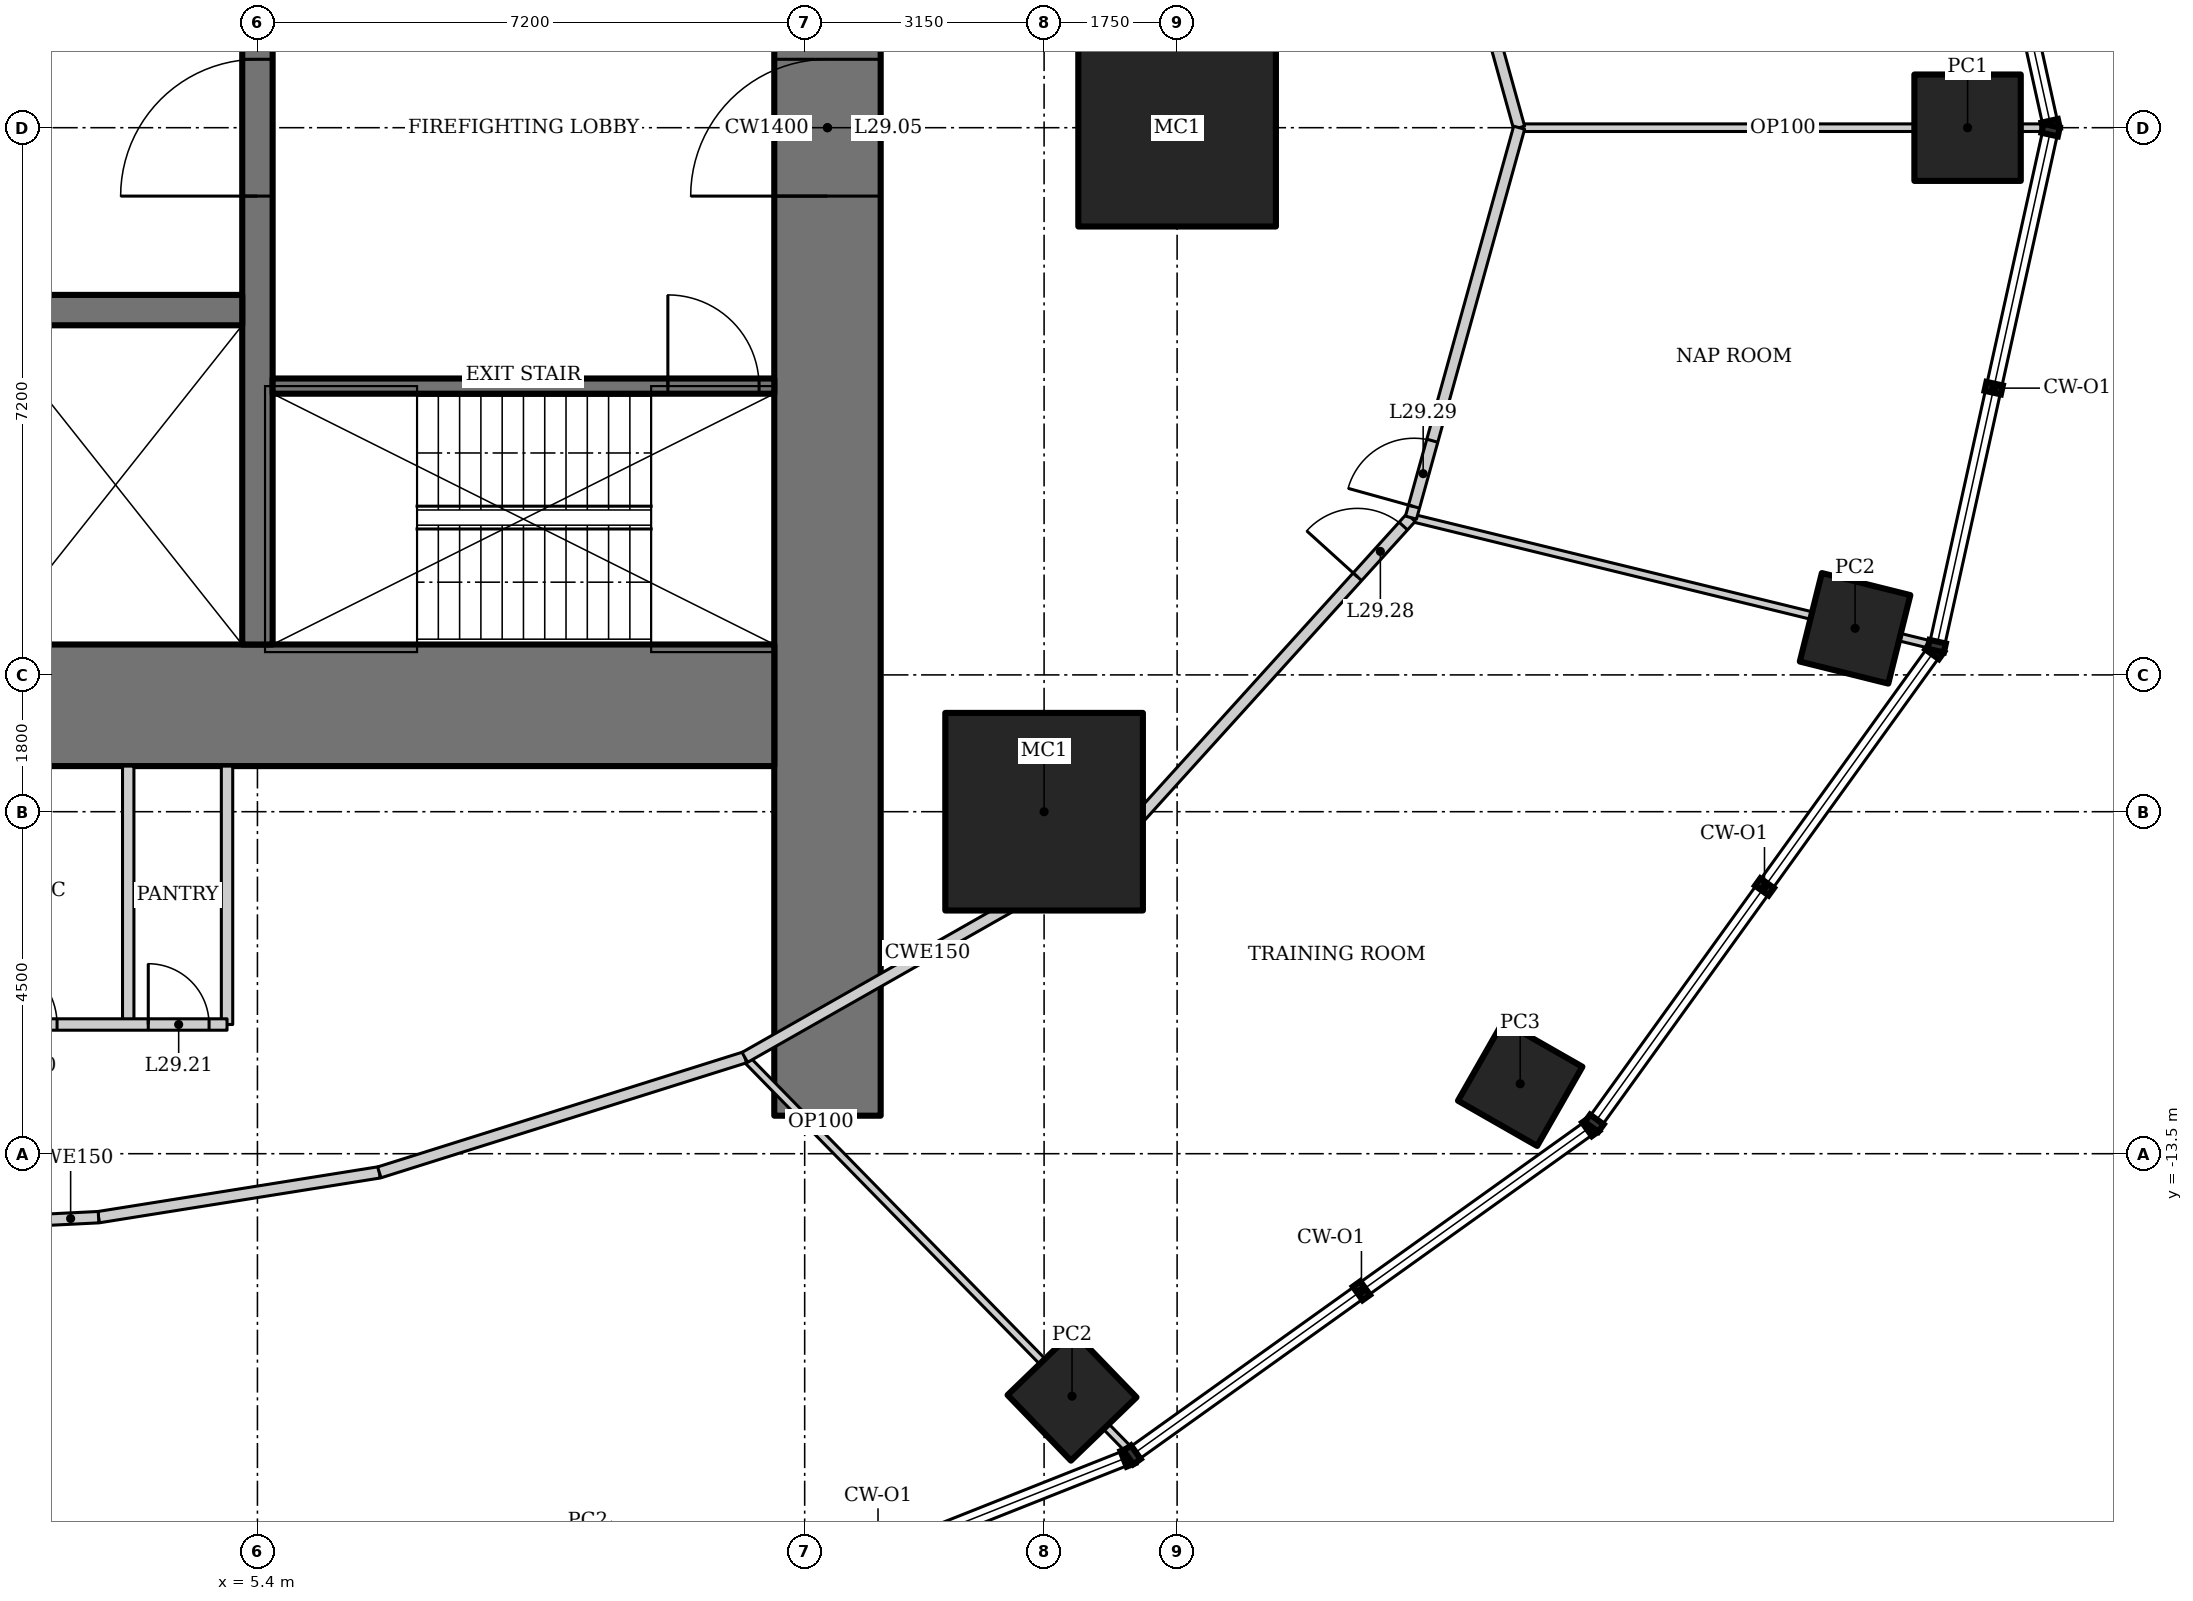
"""IFC4 building model, lengths in metres.
Left out: names, types, materials, properties, quantities, classifications, styles, units other than length and angle.
Written with IfcOpenShell. Run it as: python <this file> out.ifc"""

import sys

from ifc_helpers import new_model, si_unit, direction, frame, frame_2d, origin, origin_2d, place, context, subcontext, project, spatial, rectangle, hollow_rectangle, extrude, element, fill, save


model = new_model("IFC4")
c1 = context("Model", 3, precision=1e-05, world=origin(), true_north=direction((0.0, 1.0)))
c2 = subcontext(c1, "Body", "Model", "MODEL_VIEW")
j1 = project(units=[si_unit("LENGTHUNIT", "METRE"), si_unit("PLANEANGLEUNIT", "RADIAN")], contexts=[c1])
p1 = place(None, origin())
s1 = spatial("IfcSite", under=j1, at=p1, CompositionType="ELEMENT")
p2 = place(p1, origin())
s2 = spatial("IfcBuilding", under=s1, at=p2, CompositionType="ELEMENT")
p3 = place(p2, frame((0.0, 0.0, 125.8)))
s3 = spatial("IfcBuildingStorey", under=s2, at=p3, CompositionType="ELEMENT", Elevation=125.8)
for number, where, z_axis, x_axis in (
    (1, (17.5, 0.0, 0.0), (0.0, 0.0, 1.0), (1.0, 0.0, 0.0)),
    (2, (15.75, -9.0, 0.0), (0.0, 0.0, 1.0), (1.0, 0.0, 0.0)),
):
    element("IfcColumn", number, at=place(p3, frame(where, z_axis=z_axis, x_axis=x_axis)), inside=s3, PredefinedType="COLUMN", context=c2, shape_type="SweptSolid", body=[
        extrude(hollow_rectangle(XDim=2.6, YDim=2.6, WallThickness=0.13, at=origin_2d()), origin(), (0.0, 0.0, 1.0), 4.2),
    ])
p4 = place(p3, frame((27.9, 0.0, 0.0), z_axis=(0.0, 0.0, 1.0), x_axis=(1.0, 0.0, 0.0)))
e3 = element("IfcColumn", 3, at=p4, inside=s3, PredefinedType="COLUMN", context=c2, shape_type="SweptSolid", body=[
    extrude(hollow_rectangle(XDim=1.4, YDim=1.4, WallThickness=0.1, at=origin_2d()), origin(), (0.0, 0.0, 1.0), 4.2),
])
for number, where, z_axis, x_axis in (
    (4, (9.749, -19.133, 0.0), (0.0, 0.0, 1.0), (0.891, 0.454, 0.0)),
    (5, (16.118, -16.69, 0.0), (0.0, 0.0, 1.0), (0.719, 0.695, 0.0)),
):
    element("IfcColumn", number, at=place(p3, frame(where, z_axis=z_axis, x_axis=x_axis)), inside=s3, PredefinedType="COLUMN", context=c2, shape_type="SweptSolid", body=[
        extrude(hollow_rectangle(XDim=1.2, YDim=1.2, WallThickness=0.1, at=origin_2d()), origin(), (0.0, 0.0, 1.0), 4.2),
    ])
p5 = place(p3, frame((22.014, -12.579, 0.0), z_axis=(0.0, 0.0, 1.0), x_axis=(0.496139221777, 0.86824298017, 0.0)))
e6 = element("IfcColumn", 6, at=p5, inside=s3, PredefinedType="COLUMN", context=c2, shape_type="SweptSolid", body=[
    extrude(hollow_rectangle(XDim=1.2, YDim=1.2, WallThickness=0.12, at=origin_2d()), origin(), (0.0, 0.0, 1.0), 4.2),
])
p6 = place(p3, frame((26.42, -6.587, 0.0), z_axis=(0.0, 0.0, 1.0), x_axis=(0.2419218956, 0.970295726276, 0.0)))
e7 = element("IfcColumn", 7, at=p6, inside=s3, PredefinedType="COLUMN", context=c2, shape_type="SweptSolid", body=[
    extrude(hollow_rectangle(XDim=1.2, YDim=1.2, WallThickness=0.1, at=origin_2d()), origin(), (0.0, 0.0, 1.0), 4.2),
])
p7 = place(p3, frame((12.9, -13.0, 0.0), z_axis=(0.0, 0.0, 1.0), x_axis=(0.0, 1.0, 0.0)))
e8 = element("IfcWall", 8, at=p7, inside=s3, PredefinedType="SHEAR", context=c2, shape_type="SweptSolid", body=[
    extrude(rectangle(XDim=26.0, YDim=1.4, at=frame_2d((13.0, 0.0))), origin(), (0.0, 0.0, 1.0), 4.2),
])
p8 = place(p7, frame((12.1, 0.0, 0.0)))
e9 = element("IfcOpeningElement", 9, at=p8, cuts=e8, PredefinedType="OPENING", context=c2, shape_type="SweptSolid", body=[
    extrude(rectangle(XDim=1.8, YDim=2.1, at=frame_2d((0.9, 1.05))), frame((0.0, 0.71, 0.0), z_axis=(0.0, -1.0, 0.0), x_axis=(1.0, 0.0, 0.0)), (0.0, 0.0, 1.0), 1.42),
])
p9 = place(p3, frame((-12.2, -7.6, 0.0), z_axis=(0.0, 0.0, 1.0), x_axis=(1.0, 0.0, 0.0)))
e10 = element("IfcWall", 10, at=p9, inside=s3, PredefinedType="SHEAR", context=c2, shape_type="SweptSolid", body=[
    extrude(rectangle(XDim=24.4, YDim=1.6, at=frame_2d((12.2, 0.0))), origin(), (0.0, 0.0, 1.0), 4.2),
])
p10 = place(p3, frame((5.4, -6.8, 0.0), z_axis=(0.0, 0.0, 1.0), x_axis=(0.0, 1.0, 0.0)))
e11 = element("IfcWall", 11, at=p10, inside=s3, PredefinedType="SHEAR", context=c2, shape_type="SweptSolid", body=[
    extrude(rectangle(XDim=13.6, YDim=0.4, at=frame_2d((6.8, 0.0))), origin(), (0.0, 0.0, 1.0), 4.2),
])
p11 = place(p10, frame((5.9, 0.0, 0.0)))
e12 = element("IfcOpeningElement", 12, at=p11, cuts=e11, PredefinedType="OPENING", context=c2, shape_type="SweptSolid", body=[
    extrude(rectangle(XDim=1.8, YDim=2.1, at=frame_2d((0.9, 1.05))), frame((0.0, 0.21, 0.0), z_axis=(0.0, -1.0, 0.0), x_axis=(1.0, 0.0, 0.0)), (0.0, 0.0, 1.0), 0.42),
])
p12 = place(p3, frame((-5.2, -2.4, 0.0), z_axis=(0.0, 0.0, 1.0), x_axis=(1.0, 0.0, 0.0)))
e13 = element("IfcWall", 13, at=p12, inside=s3, PredefinedType="SHEAR", context=c2, shape_type="SweptSolid", body=[
    extrude(rectangle(XDim=10.4, YDim=0.4, at=frame_2d((5.2, 0.0))), origin(), (0.0, 0.0, 1.0), 4.2),
])
p13 = place(p3, frame((5.6, -3.4, 0.0), z_axis=(0.0, 0.0, 1.0), x_axis=(1.0, 0.0, 0.0)))
e14 = element("IfcWall", 14, at=p13, inside=s3, PredefinedType="SHEAR", context=c2, shape_type="SweptSolid", body=[
    extrude(rectangle(XDim=6.6, YDim=0.2, at=frame_2d((3.3, 0.0))), origin(), (0.0, 0.0, 1.0), 4.2),
])
p14 = place(p13, frame((5.2, 0.0, 0.0)))
e15 = element("IfcOpeningElement", 15, at=p14, cuts=e14, PredefinedType="OPENING", context=c2, shape_type="SweptSolid", body=[
    extrude(rectangle(XDim=1.2, YDim=2.1, at=frame_2d((0.6, 1.05))), frame((0.0, 0.11, 0.0), z_axis=(0.0, -1.0, 0.0), x_axis=(1.0, 0.0, 0.0)), (0.0, 0.0, 1.0), 0.22),
])
p15 = place(p3, frame((28.944, 0.0, 0.0), z_axis=(0.0, 0.0, 1.0), x_axis=(-1.0, 0.0, 0.0)))
e16 = element("IfcWall", 16, at=p15, inside=s3, PredefinedType="PARTITIONING", context=c2, shape_type="SweptSolid", body=[
    extrude(rectangle(XDim=6.944, YDim=0.1, at=frame_2d((3.472, 0.0))), origin(), (0.0, 0.0, 1.0), 3.204),
])
p16 = place(p3, frame((16.882, -17.414, 0.0), z_axis=(0.0, 0.0, 1.0), x_axis=(-0.699352142517, 0.714777294517, 0.0)))
e17 = element("IfcWall", 17, at=p16, inside=s3, PredefinedType="PARTITIONING", context=c2, shape_type="SweptSolid", body=[
    extrude(rectangle(XDim=7.249, YDim=0.1, at=frame_2d((3.625, 0.0))), origin(), (0.0, 0.0, 1.0), 3.321),
])
p17 = place(p3, frame((27.441, -6.809, 0.0), z_axis=(0.0, 0.0, 1.0), x_axis=(-0.971377572955, 0.237540755996, 0.0)))
e18 = element("IfcWall", 18, at=p17, inside=s3, PredefinedType="PARTITIONING", context=c2, shape_type="SweptSolid", body=[
    extrude(rectangle(XDim=7.066, YDim=0.1, at=frame_2d((3.533, 0.0))), origin(), (0.0, 0.0, 1.0), 3.113),
])
p18 = place(p3, frame((22.0, 0.0, 0.0), z_axis=(0.0, 0.0, 1.0), x_axis=(-0.267293817428, 0.963615076244, 0.0)))
e19 = element("IfcWall", 19, at=p18, inside=s3, PredefinedType="PARTITIONING", context=c2, shape_type="SweptSolid", body=[
    extrude(rectangle(XDim=5.324, YDim=0.15, at=frame_2d((2.662, 0.0))), origin(), (0.0, 0.0, 1.0), 4.05),
])
p19 = place(p3, frame((3.31, -14.335, 0.0), z_axis=(0.0, 0.0, 1.0), x_axis=(0.987511396594, 0.157547585181, 0.0)))
e20 = element("IfcWall", 20, at=p19, inside=s3, PredefinedType="PARTITIONING", context=c2, shape_type="SweptSolid", body=[
    extrude(rectangle(XDim=3.741, YDim=0.15, at=frame_2d((1.87, 0.0))), origin(), (0.0, 0.0, 1.0), 4.05),
])
p20 = place(p3, frame((7.004, -13.746, 0.0), z_axis=(0.0, 0.0, 1.0), x_axis=(0.953893934057, 0.300143903101, 0.0)))
e21 = element("IfcWall", 21, at=p20, inside=s3, PredefinedType="PARTITIONING", context=c2, shape_type="SweptSolid", body=[
    extrude(rectangle(XDim=5.042, YDim=0.15, at=frame_2d((2.521, 0.0))), origin(), (0.0, 0.0, 1.0), 4.05),
])
p21 = place(p3, frame((11.813, -12.232, 0.0), z_axis=(0.0, 0.0, 1.0), x_axis=(0.869375991036, 0.494151177485, 0.0)))
e22 = element("IfcWall", 22, at=p21, inside=s3, PredefinedType="PARTITIONING", context=c2, shape_type="SweptSolid", body=[
    extrude(rectangle(XDim=5.532, YDim=0.15, at=frame_2d((2.766, 0.0))), origin(), (0.0, 0.0, 1.0), 4.05),
])
p22 = place(p3, frame((16.623, -9.499, 0.0), z_axis=(0.0, 0.0, 1.0), x_axis=(0.671118353743, 0.741350224435, 0.0)))
e23 = element("IfcWall", 23, at=p22, inside=s3, PredefinedType="PARTITIONING", context=c2, shape_type="SweptSolid", body=[
    extrude(rectangle(XDim=5.892, YDim=0.15, at=frame_2d((2.946, 0.0))), origin(), (0.0, 0.0, 1.0), 4.05),
])
p23 = place(p22, frame((4.842, 0.0, 0.0)))
e24 = element("IfcOpeningElement", 24, at=p23, cuts=e23, PredefinedType="OPENING", context=c2, shape_type="SweptSolid", body=[
    extrude(rectangle(XDim=0.9, YDim=2.1, at=frame_2d((0.45, 1.05))), frame((0.0, 0.085, 0.0), z_axis=(0.0, -1.0, 0.0), x_axis=(1.0, 0.0, 0.0)), (0.0, 0.0, 1.0), 0.17),
])
p24 = place(p3, frame((20.577, -5.13, 0.0), z_axis=(0.0, 0.0, 1.0), x_axis=(0.267293817428, 0.963615076244, 0.0)))
e25 = element("IfcWall", 25, at=p24, inside=s3, PredefinedType="PARTITIONING", context=c2, shape_type="SweptSolid", body=[
    extrude(rectangle(XDim=5.324, YDim=0.15, at=frame_2d((2.662, 0.0))), origin(), (0.0, 0.0, 1.0), 4.05),
])
p25 = place(p24, frame((0.15, 0.0, 0.0)))
e26 = element("IfcOpeningElement", 26, at=p25, cuts=e25, PredefinedType="OPENING", context=c2, shape_type="SweptSolid", body=[
    extrude(rectangle(XDim=0.9, YDim=2.1, at=frame_2d((0.45, 1.05))), frame((0.0, 0.085, 0.0), z_axis=(0.0, -1.0, 0.0), x_axis=(1.0, 0.0, 0.0)), (0.0, 0.0, 1.0), 0.17),
])
for number, where, z_axis, x_axis in (
    (27, (5.0, -8.4, 0.0), (0.0, 0.0, 1.0), (0.0, -1.0, 0.0)),
    (28, (3.7, -8.4, 0.0), (0.0, 0.0, 1.0), (0.0, -1.0, 0.0)),
):
    element("IfcWall", number, at=place(p3, frame(where, z_axis=z_axis, x_axis=x_axis)), inside=s3, PredefinedType="SOLIDWALL", context=c2, shape_type="SweptSolid", body=[
        extrude(rectangle(XDim=3.4, YDim=0.15, at=frame_2d((1.7, 0.0))), origin(), (0.0, 0.0, 1.0), 4.05),
    ])
p26 = place(p3, frame((12.9, -13.0, 0.0), z_axis=(0.0, 0.0, 1.0), x_axis=(-0.714690391061, -0.699440951707, 0.0)))
e29 = element("IfcWall", 29, at=p26, inside=s3, PredefinedType="PARTITIONING", context=c2, shape_type="SweptSolid", body=[
    extrude(rectangle(XDim=0.24, YDim=0.1, at=frame_2d((0.12, 0.0))), origin(), (0.0, 0.0, 1.0), 4.05),
])
p27 = place(p3, frame((2.575, -14.372, 0.0), z_axis=(0.0, 0.0, 1.0), x_axis=(0.998758954215, 0.04980513402, 0.0)))
e30 = element("IfcWall", 30, at=p27, inside=s3, PredefinedType="PARTITIONING", context=c2, shape_type="SweptSolid", body=[
    extrude(rectangle(XDim=0.735, YDim=0.15, at=frame_2d((0.368, 0.0))), origin(), (0.0, 0.0, 1.0), 4.05),
])
p28 = place(p3, frame((1.764, -11.8, 0.0), z_axis=(0.0, 0.0, 1.0), x_axis=(1.0, 0.0, 0.0)))
e31 = element("IfcWall", 31, at=p28, inside=s3, PredefinedType="SOLIDWALL", context=c2, shape_type="SweptSolid", body=[
    extrude(rectangle(XDim=3.236, YDim=0.15, at=frame_2d((1.618, 0.0))), origin(), (0.0, 0.0, 1.0), 4.05),
])
p29 = place(p28, frame((0.1, 0.0, 0.0)))
e32 = element("IfcOpeningElement", 32, at=p29, cuts=e31, PredefinedType="OPENING", context=c2, shape_type="SweptSolid", body=[
    extrude(rectangle(XDim=0.9, YDim=2.1, at=frame_2d((0.45, 1.05))), frame((0.0, 0.085, 0.0), z_axis=(0.0, -1.0, 0.0), x_axis=(1.0, 0.0, 0.0)), (0.0, 0.0, 1.0), 0.17),
])
p30 = place(p28, frame((2.2, 0.0, 0.0)))
e33 = element("IfcOpeningElement", 33, at=p30, cuts=e31, PredefinedType="OPENING", context=c2, shape_type="SweptSolid", body=[
    extrude(rectangle(XDim=0.8, YDim=2.1, at=frame_2d((0.4, 1.05))), frame((0.0, 0.085, 0.0), z_axis=(0.0, -1.0, 0.0), x_axis=(1.0, 0.0, 0.0)), (0.0, 0.0, 1.0), 0.17),
])
p31 = place(p11, origin())
e34 = element("IfcDoor", 34, at=p31, inside=s3, OperationType="DOUBLE_DOOR_DOUBLE_SWING", PredefinedType="DOOR", context=c2, shape_type="SweptSolid", body=[
    extrude(rectangle(XDim=1.8, YDim=2.1, at=frame_2d((0.9, 1.05))), frame((0.0, 0.025, 0.0), z_axis=(0.0, -1.0, 0.0), x_axis=(1.0, 0.0, 0.0)), (0.0, 0.0, 1.0), 0.05),
])
fill(e12, e34)
p32 = place(p14, origin())
e35 = element("IfcDoor", 35, at=p32, inside=s3, OperationType="SINGLE_SWING_RIGHT", PredefinedType="DOOR", context=c2, shape_type="SweptSolid", body=[
    extrude(rectangle(XDim=1.2, YDim=2.1, at=frame_2d((0.6, 1.05))), frame((0.0, 0.025, 0.0), z_axis=(0.0, -1.0, 0.0), x_axis=(1.0, 0.0, 0.0)), (0.0, 0.0, 1.0), 0.05),
])
fill(e15, e35)
p33 = place(p8, origin())
e36 = element("IfcDoor", 36, at=p33, inside=s3, OperationType="DOUBLE_DOOR_DOUBLE_SWING", PredefinedType="DOOR", context=c2, shape_type="SweptSolid", body=[
    extrude(rectangle(XDim=1.8, YDim=2.1, at=frame_2d((0.9, 1.05))), frame((0.0, 0.025, 0.0), z_axis=(0.0, -1.0, 0.0), x_axis=(1.0, 0.0, 0.0)), (0.0, 0.0, 1.0), 0.05),
])
fill(e9, e36)
p34 = place(p29, origin())
e37 = element("IfcDoor", 37, at=p34, inside=s3, OperationType="SINGLE_SWING_LEFT", PredefinedType="DOOR", context=c2, shape_type="SweptSolid", body=[
    extrude(rectangle(XDim=0.9, YDim=2.1, at=frame_2d((0.45, 1.05))), frame((0.0, 0.025, 0.0), z_axis=(0.0, -1.0, 0.0), x_axis=(1.0, 0.0, 0.0)), (0.0, 0.0, 1.0), 0.05),
])
fill(e32, e37)
p35 = place(p30, origin())
e38 = element("IfcDoor", 38, at=p35, inside=s3, OperationType="SINGLE_SWING_LEFT", PredefinedType="DOOR", context=c2, shape_type="SweptSolid", body=[
    extrude(rectangle(XDim=0.8, YDim=2.1, at=frame_2d((0.4, 1.05))), frame((0.0, 0.025, 0.0), z_axis=(0.0, -1.0, 0.0), x_axis=(1.0, 0.0, 0.0)), (0.0, 0.0, 1.0), 0.05),
])
fill(e33, e38)
p36 = place(p23, origin())
e39 = element("IfcDoor", 39, at=p36, inside=s3, OperationType="SINGLE_SWING_LEFT", PredefinedType="DOOR", context=c2, shape_type="SweptSolid", body=[
    extrude(rectangle(XDim=0.9, YDim=2.1, at=frame_2d((0.45, 1.05))), frame((0.0, 0.025, 0.0), z_axis=(0.0, -1.0, 0.0), x_axis=(1.0, 0.0, 0.0)), (0.0, 0.0, 1.0), 0.05),
])
fill(e24, e39)
p37 = place(p25, origin())
e40 = element("IfcDoor", 40, at=p37, inside=s3, OperationType="SINGLE_SWING_LEFT", PredefinedType="DOOR", context=c2, shape_type="SweptSolid", body=[
    extrude(rectangle(XDim=0.9, YDim=2.1, at=frame_2d((0.45, 1.05))), frame((0.0, 0.025, 0.0), z_axis=(0.0, -1.0, 0.0), x_axis=(1.0, 0.0, 0.0)), (0.0, 0.0, 1.0), 0.05),
])
fill(e26, e40)
save(model, sys.argv[1])
